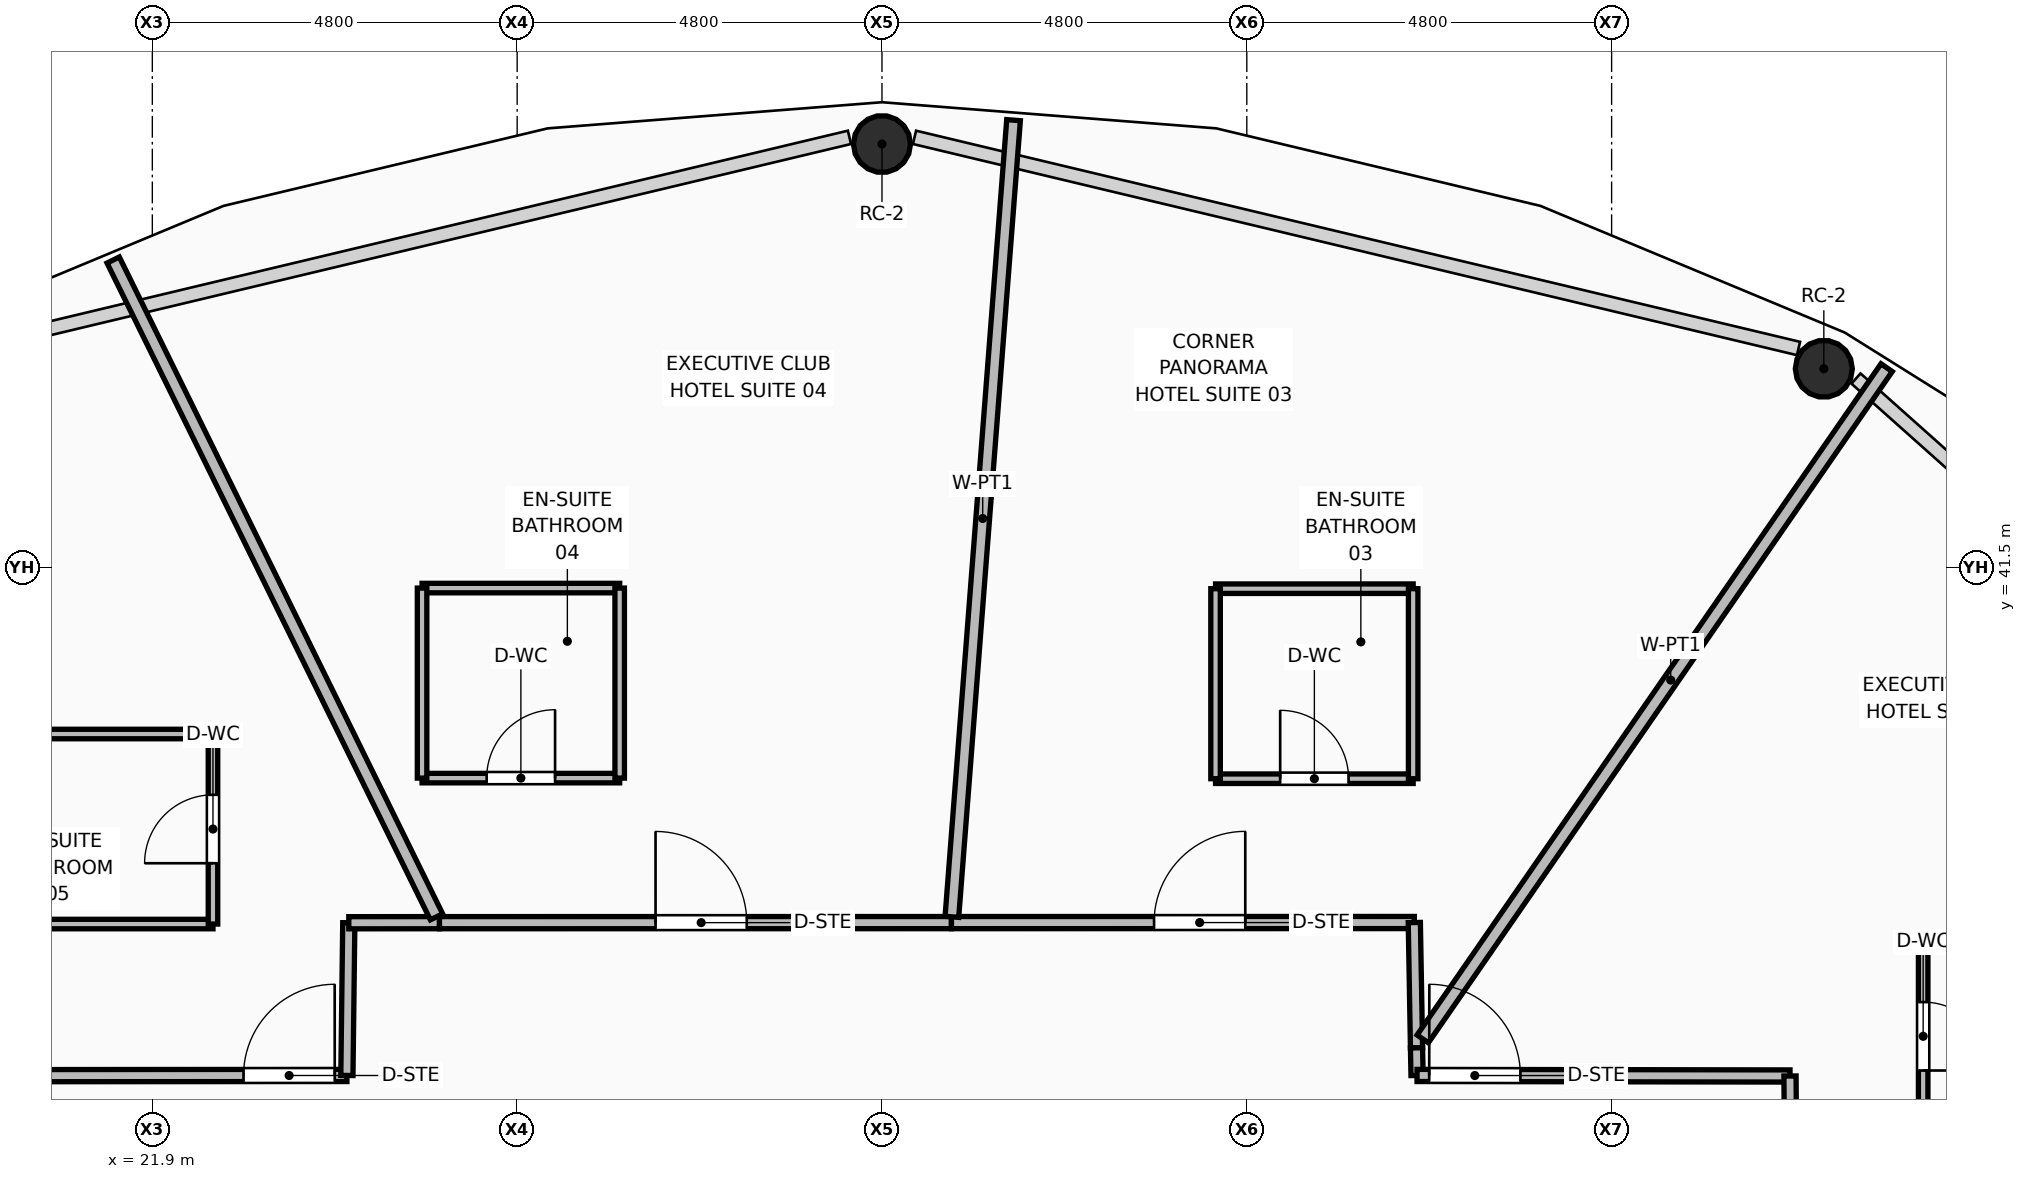
"""IFC4 building model, lengths in metres.
Left out: names, types, materials, properties, quantities, classifications, styles, units other than length and angle.
Written with IfcOpenShell. Run it as: python <this file> out.ifc"""

import sys

from ifc_helpers import new_model, si_unit, direction, frame, frame_2d, origin, origin_2d, place, context, subcontext, project, spatial, rectangle, hollow_circle, extrude, element, fill, save


model = new_model("IFC4")
c1 = context("Model", 3, precision=1e-05, world=origin(), true_north=direction((0.0, 1.0)))
c2 = subcontext(c1, "Body", "Model", "MODEL_VIEW")
j1 = project(units=[si_unit("LENGTHUNIT", "METRE"), si_unit("PLANEANGLEUNIT", "RADIAN")], contexts=[c1])
p1 = place(None, origin())
s1 = spatial("IfcSite", under=j1, at=p1, CompositionType="ELEMENT")
p2 = place(p1, origin())
s2 = spatial("IfcBuilding", under=s1, at=p2, CompositionType="ELEMENT")
p3 = place(p2, frame((0.0, 0.0, 157.2)))
s3 = spatial("IfcBuildingStorey", under=s2, at=p3, CompositionType="ELEMENT", Elevation=157.2)
for number, where, z_axis, x_axis in (
    (1, (43.892, 44.112, 0.0), (0.0, 0.0, 1.0), (1.0, 0.0, 0.0)),
    (2, (31.5, 47.069, 0.0), (0.0, 0.0, 1.0), (1.0, 0.0, 0.0)),
):
    element("IfcColumn", number, at=place(p3, frame(where, z_axis=z_axis, x_axis=x_axis)), inside=s3, PredefinedType="COLUMN", context=c2, shape_type="SweptSolid", body=[
        extrude(hollow_circle(Radius=0.375, WallThickness=0.035, at=origin_2d()), origin(), (0.0, 0.0, 1.0), 3.57),
    ])
p4 = place(p3, frame((19.56, 34.812, 0.0), z_axis=(0.0, 0.0, 1.0), x_axis=(0.999999821253, 0.000597907217, 0.0)))
e3 = element("IfcWall", 3, at=p4, inside=s3, PredefinedType="PARTITIONING", context=c2, shape_type="SweptSolid", body=[
    extrude(rectangle(XDim=4.9, YDim=0.16, at=frame_2d((2.45, 0.0))), origin(), (0.0, 0.0, 1.0), 3.006),
])
p5 = place(p4, frame((3.54, 0.0, 0.0)))
e4 = element("IfcOpeningElement", 4, at=p5, cuts=e3, PredefinedType="OPENING", context=c2, shape_type="SweptSolid", body=[
    extrude(rectangle(XDim=1.2, YDim=2.1, at=frame_2d((0.6, 1.05))), frame((0.0, 0.09, 0.0), z_axis=(0.0, -1.0, 0.0), x_axis=(1.0, 0.0, 0.0)), (0.0, 0.0, 1.0), 0.18),
])
p6 = place(p3, frame((24.46, 34.815, 0.0), z_axis=(0.0, 0.0, 1.0), x_axis=(0.01251572883, 0.999921675199, 0.0)))
e5 = element("IfcWall", 5, at=p6, inside=s3, PredefinedType="PARTITIONING", context=c2, shape_type="SweptSolid", body=[
    extrude(rectangle(XDim=2.009, YDim=0.16, at=frame_2d((1.005, 0.0))), origin(), (0.0, 0.0, 1.0), 3.55),
])
p7 = place(p3, frame((24.485, 36.824, 0.0), z_axis=(0.0, 0.0, 1.0), x_axis=(0.999999664894, 0.000818665301, 0.0)))
e6 = element("IfcWall", 6, at=p7, inside=s3, PredefinedType="PARTITIONING", context=c2, shape_type="SweptSolid", body=[
    extrude(rectangle(XDim=1.193, YDim=0.16, at=frame_2d((0.596, 0.0))), origin(), (0.0, 0.0, 1.0), 3.55),
])
p8 = place(p3, frame((25.678, 36.825, 0.0), z_axis=(0.0, 0.0, 1.0), x_axis=(0.999999989491, 0.000144974809, 0.0)))
e7 = element("IfcWall", 7, at=p8, inside=s3, PredefinedType="PARTITIONING", context=c2, shape_type="SweptSolid", body=[
    extrude(rectangle(XDim=6.736, YDim=0.16, at=frame_2d((3.368, 0.0))), origin(), (0.0, 0.0, 1.0), 3.006),
])
p9 = place(p8, frame((2.843, 0.0, 0.0)))
e8 = element("IfcOpeningElement", 8, at=p9, cuts=e7, PredefinedType="OPENING", context=c2, shape_type="SweptSolid", body=[
    extrude(rectangle(XDim=1.2, YDim=2.1, at=frame_2d((0.6, 1.05))), frame((0.0, 0.09, 0.0), z_axis=(0.0, -1.0, 0.0), x_axis=(1.0, 0.0, 0.0)), (0.0, 0.0, 1.0), 0.18),
])
p10 = place(p3, frame((32.414, 36.826, 0.0), z_axis=(0.0, 0.0, 1.0), x_axis=(0.999999987142, 0.000160359203, 0.0)))
e9 = element("IfcWall", 9, at=p10, inside=s3, PredefinedType="PARTITIONING", context=c2, shape_type="SweptSolid", body=[
    extrude(rectangle(XDim=6.09, YDim=0.16, at=frame_2d((3.045, 0.0))), origin(), (0.0, 0.0, 1.0), 3.55),
])
p11 = place(p10, frame((2.666, 0.0, 0.0)))
e10 = element("IfcOpeningElement", 10, at=p11, cuts=e9, PredefinedType="OPENING", context=c2, shape_type="SweptSolid", body=[
    extrude(rectangle(XDim=1.2, YDim=2.1, at=frame_2d((0.6, 1.05))), frame((0.0, 0.09, 0.0), z_axis=(0.0, -1.0, 0.0), x_axis=(1.0, 0.0, 0.0)), (0.0, 0.0, 1.0), 0.18),
])
p12 = place(p3, frame((38.504, 36.827, 0.0), z_axis=(0.0, 0.0, 1.0), x_axis=(0.017616454452, -0.999844818226, 0.0)))
e11 = element("IfcWall", 11, at=p12, inside=s3, PredefinedType="PARTITIONING", context=c2, shape_type="SweptSolid", body=[
    extrude(rectangle(XDim=1.649, YDim=0.16, at=frame_2d((0.825, 0.0))), origin(), (0.0, 0.0, 1.0), 3.55),
])
p13 = place(p3, frame((38.533, 35.178, 0.0), z_axis=(0.0, 0.0, 1.0), x_axis=(0.01949864601, -0.99980988333, 0.0)))
e12 = element("IfcWall", 12, at=p13, inside=s3, PredefinedType="PARTITIONING", context=c2, shape_type="SweptSolid", body=[
    extrude(rectangle(XDim=0.363, YDim=0.16, at=frame_2d((0.182, 0.0))), origin(), (0.0, 0.0, 1.0), 3.55),
])
p14 = place(p3, frame((38.54, 34.815, 0.0), z_axis=(0.0, 0.0, 1.0), x_axis=(0.999999029632, -0.001393102783, 0.0)))
e13 = element("IfcWall", 13, at=p14, inside=s3, PredefinedType="PARTITIONING", context=c2, shape_type="SweptSolid", body=[
    extrude(rectangle(XDim=4.907, YDim=0.16, at=frame_2d((2.454, 0.0))), origin(), (0.0, 0.0, 1.0), 3.006),
])
p15 = place(p14, frame((0.16, 0.0, 0.0)))
e14 = element("IfcOpeningElement", 14, at=p15, cuts=e13, PredefinedType="OPENING", context=c2, shape_type="SweptSolid", body=[
    extrude(rectangle(XDim=1.2, YDim=2.1, at=frame_2d((0.6, 1.05))), frame((0.0, 0.09, 0.0), z_axis=(0.0, -1.0, 0.0), x_axis=(1.0, 0.0, 0.0)), (0.0, 0.0, 1.0), 0.18),
])
p16 = place(p3, frame((43.447, 34.808, 0.0), z_axis=(0.0, 0.0, 1.0), x_axis=(0.006526585281, -0.999978701615, 0.0)))
e15 = element("IfcWall", 15, at=p16, inside=s3, PredefinedType="PARTITIONING", context=c2, shape_type="SweptSolid", body=[
    extrude(rectangle(XDim=2.768, YDim=0.16, at=frame_2d((1.384, 0.0))), origin(), (0.0, 0.0, 1.0), 3.006),
])
p17 = place(p3, frame((45.128, 32.115, 0.0), z_axis=(0.0, 0.0, 1.0), x_axis=(0.886452073938, 0.46282039779, 0.0)))
e16 = element("IfcWall", 16, at=p17, inside=s3, PredefinedType="PARTITIONING", context=c2, shape_type="SweptSolid", body=[
    extrude(rectangle(XDim=9.183, YDim=0.18, at=frame_2d((4.591, 0.0))), origin(), (0.0, 0.0, 1.0), 2.852),
])
p18 = place(p3, frame((38.615, 35.296, 0.0), z_axis=(0.0, 0.0, 1.0), x_axis=(0.568530950042, 0.822661873946, 0.0)))
e17 = element("IfcWall", 17, at=p18, inside=s3, PredefinedType="PARTITIONING", context=c2, shape_type="SweptSolid", body=[
    extrude(rectangle(XDim=10.735, YDim=0.18, at=frame_2d((5.367, 0.0))), origin(), (0.0, 0.0, 1.0), 2.852),
])
p19 = place(p3, frame((32.42, 36.902, 0.0), z_axis=(0.0, 0.0, 1.0), x_axis=(0.077151140833, 0.997019408772, 0.0)))
e18 = element("IfcWall", 18, at=p19, inside=s3, PredefinedType="PARTITIONING", context=c2, shape_type="SweptSolid", body=[
    extrude(rectangle(XDim=10.512, YDim=0.18, at=frame_2d((5.256, 0.0))), origin(), (0.0, 0.0, 1.0), 2.852),
])
p20 = place(p3, frame((25.639, 36.902, 0.0), z_axis=(0.0, 0.0, 1.0), x_axis=(-0.44167900267, 0.897173148617, 0.0)))
e19 = element("IfcWall", 19, at=p20, inside=s3, PredefinedType="PARTITIONING", context=c2, shape_type="SweptSolid", body=[
    extrude(rectangle(XDim=9.631, YDim=0.18, at=frame_2d((4.815, 0.0))), origin(), (0.0, 0.0, 1.0), 2.852),
])
p21 = place(p3, frame((45.199, 36.58, 0.0), z_axis=(0.0, 0.0, 1.0), x_axis=(1.0, 0.0, 0.0)))
e20 = element("IfcWall", 20, at=p21, inside=s3, PredefinedType="PARTITIONING", context=c2, shape_type="SweptSolid", body=[
    extrude(rectangle(XDim=2.6, YDim=0.125, at=frame_2d((1.3, 0.0))), origin(), (0.0, 0.0, 1.0), 3.55),
])
p22 = place(p3, frame((45.199, 34.08, 0.0), z_axis=(0.0, 0.0, 1.0), x_axis=(0.0, 1.0, 0.0)))
e21 = element("IfcWall", 21, at=p22, inside=s3, PredefinedType="PARTITIONING", context=c2, shape_type="SweptSolid", body=[
    extrude(rectangle(XDim=2.5, YDim=0.125, at=frame_2d((1.25, 0.0))), origin(), (0.0, 0.0, 1.0), 3.55),
])
p23 = place(p22, frame((0.8, 0.0, 0.0)))
e22 = element("IfcOpeningElement", 22, at=p23, cuts=e21, PredefinedType="OPENING", context=c2, shape_type="SweptSolid", body=[
    extrude(rectangle(XDim=0.9, YDim=2.1, at=frame_2d((0.45, 1.05))), frame((0.0, 0.073, 0.0), z_axis=(0.0, -1.0, 0.0), x_axis=(1.0, 0.0, 0.0)), (0.0, 0.0, 1.0), 0.145),
])
p24 = place(p3, frame((35.889, 38.719, 0.0), z_axis=(0.0, 0.0, 1.0), x_axis=(1.0, 0.0, 0.0)))
e23 = element("IfcWall", 23, at=p24, inside=s3, PredefinedType="PARTITIONING", context=c2, shape_type="SweptSolid", body=[
    extrude(rectangle(XDim=2.6, YDim=0.125, at=frame_2d((1.3, 0.0))), origin(), (0.0, 0.0, 1.0), 3.55),
])
p25 = place(p24, frame((0.85, 0.0, 0.0)))
e24 = element("IfcOpeningElement", 24, at=p25, cuts=e23, PredefinedType="OPENING", context=c2, shape_type="SweptSolid", body=[
    extrude(rectangle(XDim=0.9, YDim=2.1, at=frame_2d((0.45, 1.05))), frame((0.0, 0.073, 0.0), z_axis=(0.0, -1.0, 0.0), x_axis=(1.0, 0.0, 0.0)), (0.0, 0.0, 1.0), 0.145),
])
p26 = place(p3, frame((35.889, 41.219, 0.0), z_axis=(0.0, 0.0, 1.0), x_axis=(1.0, 0.0, 0.0)))
e25 = element("IfcWall", 25, at=p26, inside=s3, PredefinedType="PARTITIONING", context=c2, shape_type="SweptSolid", body=[
    extrude(rectangle(XDim=2.6, YDim=0.125, at=frame_2d((1.3, 0.0))), origin(), (0.0, 0.0, 1.0), 3.55),
])
for number, where, z_axis, x_axis in (
    (26, (35.889, 38.719, 0.0), (0.0, 0.0, 1.0), (0.0, 1.0, 0.0)),
    (27, (38.489, 38.719, 0.0), (0.0, 0.0, 1.0), (0.0, 1.0, 0.0)),
):
    element("IfcWall", number, at=place(p3, frame(where, z_axis=z_axis, x_axis=x_axis)), inside=s3, PredefinedType="PARTITIONING", context=c2, shape_type="SweptSolid", body=[
        extrude(rectangle(XDim=2.5, YDim=0.125, at=frame_2d((1.25, 0.0))), origin(), (0.0, 0.0, 1.0), 3.55),
    ])
p27 = place(p3, frame((25.449, 38.727, 0.0), z_axis=(0.0, 0.0, 1.0), x_axis=(1.0, 0.0, 0.0)))
e28 = element("IfcWall", 28, at=p27, inside=s3, PredefinedType="PARTITIONING", context=c2, shape_type="SweptSolid", body=[
    extrude(rectangle(XDim=2.6, YDim=0.125, at=frame_2d((1.3, 0.0))), origin(), (0.0, 0.0, 1.0), 3.55),
])
p28 = place(p27, frame((0.85, 0.0, 0.0)))
e29 = element("IfcOpeningElement", 29, at=p28, cuts=e28, PredefinedType="OPENING", context=c2, shape_type="SweptSolid", body=[
    extrude(rectangle(XDim=0.9, YDim=2.1, at=frame_2d((0.45, 1.05))), frame((0.0, 0.073, 0.0), z_axis=(0.0, -1.0, 0.0), x_axis=(1.0, 0.0, 0.0)), (0.0, 0.0, 1.0), 0.145),
])
p29 = place(p3, frame((25.449, 41.227, 0.0), z_axis=(0.0, 0.0, 1.0), x_axis=(1.0, 0.0, 0.0)))
e30 = element("IfcWall", 30, at=p29, inside=s3, PredefinedType="PARTITIONING", context=c2, shape_type="SweptSolid", body=[
    extrude(rectangle(XDim=2.6, YDim=0.125, at=frame_2d((1.3, 0.0))), origin(), (0.0, 0.0, 1.0), 3.55),
])
for number, where, z_axis, x_axis in (
    (31, (25.449, 38.727, 0.0), (0.0, 0.0, 1.0), (0.0, 1.0, 0.0)),
    (32, (28.049, 38.727, 0.0), (0.0, 0.0, 1.0), (0.0, 1.0, 0.0)),
):
    element("IfcWall", number, at=place(p3, frame(where, z_axis=z_axis, x_axis=x_axis)), inside=s3, PredefinedType="PARTITIONING", context=c2, shape_type="SweptSolid", body=[
        extrude(rectangle(XDim=2.5, YDim=0.125, at=frame_2d((1.25, 0.0))), origin(), (0.0, 0.0, 1.0), 3.55),
    ])
for number, where, z_axis, x_axis in (
    (33, (20.098, 36.807, 0.0), (0.0, 0.0, 1.0), (1.0, 0.0, 0.0)),
    (34, (20.098, 39.307, 0.0), (0.0, 0.0, 1.0), (1.0, 0.0, 0.0)),
):
    element("IfcWall", number, at=place(p3, frame(where, z_axis=z_axis, x_axis=x_axis)), inside=s3, PredefinedType="PARTITIONING", context=c2, shape_type="SweptSolid", body=[
        extrude(rectangle(XDim=2.6, YDim=0.125, at=frame_2d((1.3, 0.0))), origin(), (0.0, 0.0, 1.0), 3.006),
    ])
p30 = place(p3, frame((22.698, 36.807, 0.0), z_axis=(0.0, 0.0, 1.0), x_axis=(0.0, 1.0, 0.0)))
e35 = element("IfcWall", 35, at=p30, inside=s3, PredefinedType="PARTITIONING", context=c2, shape_type="SweptSolid", body=[
    extrude(rectangle(XDim=2.5, YDim=0.125, at=frame_2d((1.25, 0.0))), origin(), (0.0, 0.0, 1.0), 3.55),
])
p31 = place(p30, frame((0.8, 0.0, 0.0)))
e36 = element("IfcOpeningElement", 36, at=p31, cuts=e35, PredefinedType="OPENING", context=c2, shape_type="SweptSolid", body=[
    extrude(rectangle(XDim=0.9, YDim=2.1, at=frame_2d((0.45, 1.05))), frame((0.0, 0.073, 0.0), z_axis=(0.0, -1.0, 0.0), x_axis=(1.0, 0.0, 0.0)), (0.0, 0.0, 1.0), 0.145),
])
p32 = place(p23, frame((0.9, 0.0, 0.0), z_axis=(0.0, 0.0, 1.0), x_axis=(-1.0, 0.0, 0.0)))
e37 = element("IfcDoor", 37, at=p32, inside=s3, OperationType="SINGLE_SWING_RIGHT", PredefinedType="DOOR", context=c2, shape_type="SweptSolid", body=[
    extrude(rectangle(XDim=0.9, YDim=2.1, at=frame_2d((0.45, 1.05))), frame((0.0, 0.025, 0.0), z_axis=(0.0, -1.0, 0.0), x_axis=(1.0, 0.0, 0.0)), (0.0, 0.0, 1.0), 0.05),
])
fill(e22, e37)
p33 = place(p15, origin())
e38 = element("IfcDoor", 38, at=p33, inside=s3, OperationType="SINGLE_SWING_LEFT", PredefinedType="DOOR", context=c2, shape_type="SweptSolid", body=[
    extrude(rectangle(XDim=1.2, YDim=2.1, at=frame_2d((0.6, 1.05))), frame((0.0, 0.025, 0.0), z_axis=(0.0, -1.0, 0.0), x_axis=(1.0, 0.0, 0.0)), (0.0, 0.0, 1.0), 0.05),
])
fill(e14, e38)
p34 = place(p25, origin())
e39 = element("IfcDoor", 39, at=p34, inside=s3, OperationType="SINGLE_SWING_LEFT", PredefinedType="DOOR", context=c2, shape_type="SweptSolid", body=[
    extrude(rectangle(XDim=0.9, YDim=2.1, at=frame_2d((0.45, 1.05))), frame((0.0, 0.025, 0.0), z_axis=(0.0, -1.0, 0.0), x_axis=(1.0, 0.0, 0.0)), (0.0, 0.0, 1.0), 0.05),
])
fill(e24, e39)
p35 = place(p11, origin())
e40 = element("IfcDoor", 40, at=p35, inside=s3, OperationType="SINGLE_SWING_RIGHT", PredefinedType="DOOR", context=c2, shape_type="SweptSolid", body=[
    extrude(rectangle(XDim=1.2, YDim=2.1, at=frame_2d((0.6, 1.05))), frame((0.0, 0.025, 0.0), z_axis=(0.0, -1.0, 0.0), x_axis=(1.0, 0.0, 0.0)), (0.0, 0.0, 1.0), 0.05),
])
fill(e10, e40)
p36 = place(p28, origin())
e41 = element("IfcDoor", 41, at=p36, inside=s3, OperationType="SINGLE_SWING_RIGHT", PredefinedType="DOOR", context=c2, shape_type="SweptSolid", body=[
    extrude(rectangle(XDim=0.9, YDim=2.1, at=frame_2d((0.45, 1.05))), frame((0.0, 0.025, 0.0), z_axis=(0.0, -1.0, 0.0), x_axis=(1.0, 0.0, 0.0)), (0.0, 0.0, 1.0), 0.05),
])
fill(e29, e41)
p37 = place(p9, origin())
e42 = element("IfcDoor", 42, at=p37, inside=s3, OperationType="SINGLE_SWING_LEFT", PredefinedType="DOOR", context=c2, shape_type="SweptSolid", body=[
    extrude(rectangle(XDim=1.2, YDim=2.1, at=frame_2d((0.6, 1.05))), frame((0.0, 0.025, 0.0), z_axis=(0.0, -1.0, 0.0), x_axis=(1.0, 0.0, 0.0)), (0.0, 0.0, 1.0), 0.05),
])
fill(e8, e42)
p38 = place(p31, origin())
e43 = element("IfcDoor", 43, at=p38, inside=s3, OperationType="SINGLE_SWING_LEFT", PredefinedType="DOOR", context=c2, shape_type="SweptSolid", body=[
    extrude(rectangle(XDim=0.9, YDim=2.1, at=frame_2d((0.45, 1.05))), frame((0.0, 0.025, 0.0), z_axis=(0.0, -1.0, 0.0), x_axis=(1.0, 0.0, 0.0)), (0.0, 0.0, 1.0), 0.05),
])
fill(e36, e43)
p39 = place(p5, origin())
e44 = element("IfcDoor", 44, at=p39, inside=s3, OperationType="SINGLE_SWING_RIGHT", PredefinedType="DOOR", context=c2, shape_type="SweptSolid", body=[
    extrude(rectangle(XDim=1.2, YDim=2.1, at=frame_2d((0.6, 1.05))), frame((0.0, 0.025, 0.0), z_axis=(0.0, -1.0, 0.0), x_axis=(1.0, 0.0, 0.0)), (0.0, 0.0, 1.0), 0.05),
])
fill(e4, e44)
save(model, sys.argv[1])
